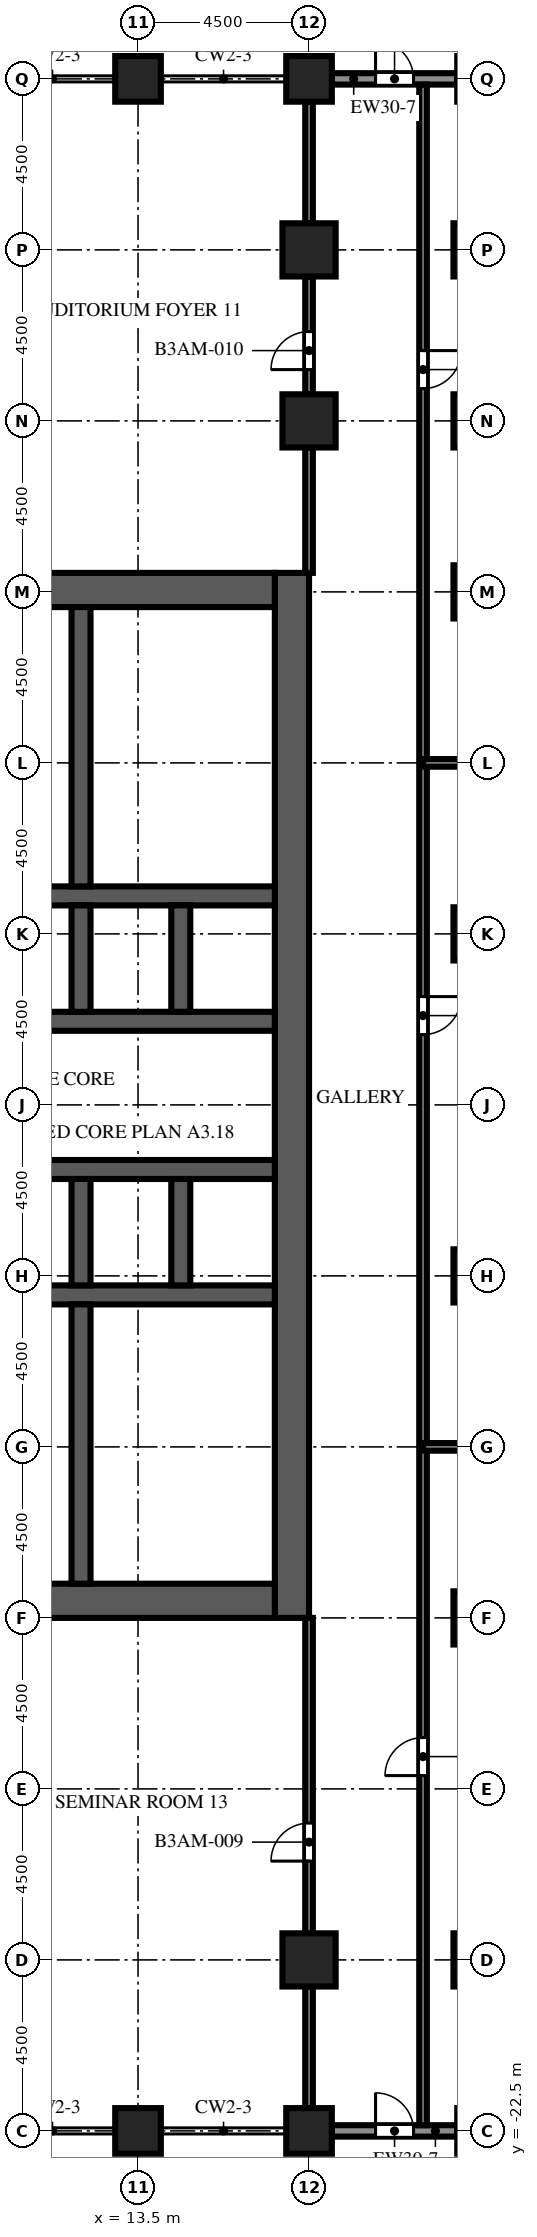
"""IFC4 building model, lengths in metres.
Left out: names, types, materials, properties, quantities, classifications, styles, units other than length and angle.
Written with IfcOpenShell. Run it as: python <this file> out.ifc"""

import sys

from ifc_helpers import new_model, si_unit, direction, frame, frame_2d, origin, origin_2d, place, context, subcontext, project, spatial, rectangle, extrude, element, fill, save


model = new_model("IFC4")
c1 = context("Model", 3, precision=1e-05, world=origin(), true_north=direction((0.0, 1.0)))
c2 = subcontext(c1, "Body", "Model", "MODEL_VIEW")
j1 = project(units=[si_unit("LENGTHUNIT", "METRE"), si_unit("PLANEANGLEUNIT", "RADIAN")], contexts=[c1])
p1 = place(None, origin())
s1 = spatial("IfcSite", under=j1, at=p1, CompositionType="ELEMENT")
p2 = place(p1, origin())
s2 = spatial("IfcBuilding", under=s1, at=p2, CompositionType="ELEMENT")
p3 = place(p2, frame((0.0, 0.0, 110.7)))
s3 = spatial("IfcBuildingStorey", under=s2, at=p3, CompositionType="ELEMENT", Elevation=110.7)
for number, where, z_axis, x_axis in (
    (1, (13.5, -22.5, 0.0), (0.0, 0.0, 1.0), (1.0, 0.0, 0.0)),
    (2, (13.5, 31.5, 0.0), (0.0, 0.0, 1.0), (1.0, 0.0, 0.0)),
    (3, (18.0, -22.5, 0.0), (0.0, 0.0, 1.0), (1.0, 0.0, 0.0)),
    (4, (18.0, 31.5, 0.0), (0.0, 0.0, 1.0), (1.0, 0.0, 0.0)),
):
    element("IfcColumn", number, at=place(p3, frame(where, z_axis=z_axis, x_axis=x_axis)), inside=s3, PredefinedType="COLUMN", context=c2, shape_type="SweptSolid", body=[
        extrude(rectangle(XDim=1.2, YDim=1.2, at=origin_2d()), origin(), (0.0, 0.0, 1.0), 6.0),
    ])
for number, where, z_axis, x_axis in (
    (5, (18.0, -18.0, 0.0), (0.0, 0.0, 1.0), (1.0, 0.0, 0.0)),
    (6, (18.0, 22.5, 0.0), (0.0, 0.0, 1.0), (1.0, 0.0, 0.0)),
    (7, (18.0, 27.0, 0.0), (0.0, 0.0, 1.0), (1.0, 0.0, 0.0)),
    (8, (22.5, -18.0, 0.0), (0.0, 0.0, 1.0), (1.0, 0.0, 0.0)),
    (9, (22.5, -9.0, 0.0), (0.0, 0.0, 1.0), (1.0, 0.0, 0.0)),
    (10, (22.5, 0.0, 0.0), (0.0, 0.0, 1.0), (1.0, 0.0, 0.0)),
    (11, (22.5, 9.0, 0.0), (0.0, 0.0, 1.0), (1.0, 0.0, 0.0)),
    (12, (22.5, 18.0, 0.0), (0.0, 0.0, 1.0), (1.0, 0.0, 0.0)),
    (13, (22.5, 22.5, 0.0), (0.0, 0.0, 1.0), (1.0, 0.0, 0.0)),
    (14, (22.5, 27.0, 0.0), (0.0, 0.0, 1.0), (1.0, 0.0, 0.0)),
):
    element("IfcColumn", number, at=place(p3, frame(where, z_axis=z_axis, x_axis=x_axis)), inside=s3, PredefinedType="COLUMN", context=c2, shape_type="SweptSolid", body=[
        extrude(rectangle(XDim=1.4, YDim=1.4, at=origin_2d()), origin(), (0.0, 0.0, 1.0), 6.0),
    ])
p4 = place(p3, frame((17.55, -9.0, 0.0), z_axis=(0.0, 0.0, 1.0), x_axis=(0.0, 1.0, 0.0)))
e15 = element("IfcWall", 15, at=p4, inside=s3, PredefinedType="SHEAR", context=c2, shape_type="SweptSolid", body=[
    extrude(rectangle(XDim=27.5, YDim=0.9, at=frame_2d((13.75, 0.0))), origin(), (0.0, 0.0, 1.0), 6.0),
])
p5 = place(p4, frame((12.55, 0.0, 0.0)))
e16 = element("IfcOpeningElement", 16, at=p5, cuts=e15, PredefinedType="OPENING", context=c2, shape_type="SweptSolid", body=[
    extrude(rectangle(XDim=2.4, YDim=2.4, at=frame_2d((1.2, 1.2))), frame((0.0, 0.46, 0.0), z_axis=(0.0, -1.0, 0.0), x_axis=(1.0, 0.0, 0.0)), (0.0, 0.0, 1.0), 0.92),
])
p6 = place(p4, frame((6.825, 0.0, 0.0)))
e17 = element("IfcOpeningElement", 17, at=p6, cuts=e15, PredefinedType="OPENING", context=c2, shape_type="SweptSolid", body=[
    extrude(rectangle(XDim=1.2, YDim=2.1, at=frame_2d((0.6, 1.05))), frame((0.0, 0.46, 0.0), z_axis=(0.0, -1.0, 0.0), x_axis=(1.0, 0.0, 0.0)), (0.0, 0.0, 1.0), 0.92),
])
p7 = place(p4, frame((19.475, 0.0, 0.0)))
e18 = element("IfcOpeningElement", 18, at=p7, cuts=e15, PredefinedType="OPENING", context=c2, shape_type="SweptSolid", body=[
    extrude(rectangle(XDim=1.2, YDim=2.1, at=frame_2d((0.6, 1.05))), frame((0.0, 0.46, 0.0), z_axis=(0.0, -1.0, 0.0), x_axis=(1.0, 0.0, 0.0)), (0.0, 0.0, 1.0), 0.92),
])
for number, where, z_axis, x_axis in (
    (19, (6.9, -8.55, 0.0), (0.0, 0.0, 1.0), (1.0, 0.0, 0.0)),
    (20, (6.9, 18.05, 0.0), (0.0, 0.0, 1.0), (1.0, 0.0, 0.0)),
):
    element("IfcWall", number, at=place(p3, frame(where, z_axis=z_axis, x_axis=x_axis)), inside=s3, PredefinedType="SHEAR", context=c2, shape_type="SweptSolid", body=[
        extrude(rectangle(XDim=10.2, YDim=0.9, at=frame_2d((5.1, 0.0))), origin(), (0.0, 0.0, 1.0), 6.0),
    ])
p8 = place(p3, frame((6.9, -0.5, 0.0), z_axis=(0.0, 0.0, 1.0), x_axis=(1.0, 0.0, 0.0)))
e21 = element("IfcWall", 21, at=p8, inside=s3, PredefinedType="SHEAR", context=c2, shape_type="SweptSolid", body=[
    extrude(rectangle(XDim=10.2, YDim=0.5, at=frame_2d((5.1, 0.0))), origin(), (0.0, 0.0, 1.0), 6.0),
])
p9 = place(p3, frame((6.9, 2.8, 0.0), z_axis=(0.0, 0.0, 1.0), x_axis=(1.0, 0.0, 0.0)))
e22 = element("IfcWall", 22, at=p9, inside=s3, PredefinedType="SHEAR", context=c2, shape_type="SweptSolid", body=[
    extrude(rectangle(XDim=10.2, YDim=0.5, at=frame_2d((5.1, 0.0))), origin(), (0.0, 0.0, 1.0), 6.0),
])
p10 = place(p9, frame((0.562, 0.0, 0.0)))
e23 = element("IfcOpeningElement", 23, at=p10, cuts=e22, PredefinedType="OPENING", context=c2, shape_type="SweptSolid", body=[
    extrude(rectangle(XDim=1.1, YDim=2.1, at=frame_2d((0.55, 1.05))), frame((0.0, 0.26, 0.0), z_axis=(0.0, -1.0, 0.0), x_axis=(1.0, 0.0, 0.0)), (0.0, 0.0, 1.0), 0.52),
])
p11 = place(p9, frame((3.238, 0.0, 0.0)))
e24 = element("IfcOpeningElement", 24, at=p11, cuts=e22, PredefinedType="OPENING", context=c2, shape_type="SweptSolid", body=[
    extrude(rectangle(XDim=1.1, YDim=2.1, at=frame_2d((0.55, 1.05))), frame((0.0, 0.26, 0.0), z_axis=(0.0, -1.0, 0.0), x_axis=(1.0, 0.0, 0.0)), (0.0, 0.0, 1.0), 0.52),
])
p12 = place(p9, frame((8.538, 0.0, 0.0)))
e25 = element("IfcOpeningElement", 25, at=p12, cuts=e22, PredefinedType="OPENING", context=c2, shape_type="SweptSolid", body=[
    extrude(rectangle(XDim=1.1, YDim=2.1, at=frame_2d((0.55, 1.05))), frame((0.0, 0.26, 0.0), z_axis=(0.0, -1.0, 0.0), x_axis=(1.0, 0.0, 0.0)), (0.0, 0.0, 1.0), 0.52),
])
p13 = place(p3, frame((6.9, 6.7, 0.0), z_axis=(0.0, 0.0, 1.0), x_axis=(1.0, 0.0, 0.0)))
e26 = element("IfcWall", 26, at=p13, inside=s3, PredefinedType="SHEAR", context=c2, shape_type="SweptSolid", body=[
    extrude(rectangle(XDim=10.2, YDim=0.5, at=frame_2d((5.1, 0.0))), origin(), (0.0, 0.0, 1.0), 6.0),
])
p14 = place(p13, frame((0.562, 0.0, 0.0)))
e27 = element("IfcOpeningElement", 27, at=p14, cuts=e26, PredefinedType="OPENING", context=c2, shape_type="SweptSolid", body=[
    extrude(rectangle(XDim=1.1, YDim=2.1, at=frame_2d((0.55, 1.05))), frame((0.0, 0.26, 0.0), z_axis=(0.0, -1.0, 0.0), x_axis=(1.0, 0.0, 0.0)), (0.0, 0.0, 1.0), 0.52),
])
p15 = place(p13, frame((3.288, 0.0, 0.0)))
e28 = element("IfcOpeningElement", 28, at=p15, cuts=e26, PredefinedType="OPENING", context=c2, shape_type="SweptSolid", body=[
    extrude(rectangle(XDim=1.0, YDim=2.1, at=frame_2d((0.5, 1.05))), frame((0.0, 0.26, 0.0), z_axis=(0.0, -1.0, 0.0), x_axis=(1.0, 0.0, 0.0)), (0.0, 0.0, 1.0), 0.52),
])
p16 = place(p13, frame((5.913, 0.0, 0.0)))
e29 = element("IfcOpeningElement", 29, at=p16, cuts=e26, PredefinedType="OPENING", context=c2, shape_type="SweptSolid", body=[
    extrude(rectangle(XDim=1.0, YDim=2.1, at=frame_2d((0.5, 1.05))), frame((0.0, 0.26, 0.0), z_axis=(0.0, -1.0, 0.0), x_axis=(1.0, 0.0, 0.0)), (0.0, 0.0, 1.0), 0.52),
])
p17 = place(p13, frame((8.587, 0.0, 0.0)))
e30 = element("IfcOpeningElement", 30, at=p17, cuts=e26, PredefinedType="OPENING", context=c2, shape_type="SweptSolid", body=[
    extrude(rectangle(XDim=1.0, YDim=2.1, at=frame_2d((0.5, 1.05))), frame((0.0, 0.26, 0.0), z_axis=(0.0, -1.0, 0.0), x_axis=(1.0, 0.0, 0.0)), (0.0, 0.0, 1.0), 0.52),
])
p18 = place(p3, frame((6.9, 10.0, 0.0), z_axis=(0.0, 0.0, 1.0), x_axis=(1.0, 0.0, 0.0)))
e31 = element("IfcWall", 31, at=p18, inside=s3, PredefinedType="SHEAR", context=c2, shape_type="SweptSolid", body=[
    extrude(rectangle(XDim=10.2, YDim=0.5, at=frame_2d((5.1, 0.0))), origin(), (0.0, 0.0, 1.0), 6.0),
])
for number, where, z_axis, x_axis in (
    (32, (12.0, -0.25, 0.0), (0.0, 0.0, 1.0), (0.0, 1.0, 0.0)),
    (33, (12.0, 6.95, 0.0), (0.0, 0.0, 1.0), (0.0, 1.0, 0.0)),
    (34, (14.625, -0.25, 0.0), (0.0, 0.0, 1.0), (0.0, 1.0, 0.0)),
    (35, (14.625, 6.95, 0.0), (0.0, 0.0, 1.0), (0.0, 1.0, 0.0)),
):
    element("IfcWall", number, at=place(p3, frame(where, z_axis=z_axis, x_axis=x_axis)), inside=s3, PredefinedType="SHEAR", context=c2, shape_type="SweptSolid", body=[
        extrude(rectangle(XDim=2.8, YDim=0.5, at=frame_2d((1.4, 0.0))), origin(), (0.0, 0.0, 1.0), 6.0),
    ])
for number, where, z_axis, x_axis in (
    (36, (12.0, -8.1, 0.0), (0.0, 0.0, 1.0), (0.0, 1.0, 0.0)),
    (37, (12.0, 10.25, 0.0), (0.0, 0.0, 1.0), (0.0, 1.0, 0.0)),
):
    element("IfcWall", number, at=place(p3, frame(where, z_axis=z_axis, x_axis=x_axis)), inside=s3, PredefinedType="SHEAR", context=c2, shape_type="SweptSolid", body=[
        extrude(rectangle(XDim=7.35, YDim=0.5, at=frame_2d((3.675, 0.0))), origin(), (0.0, 0.0, 1.0), 6.0),
    ])
p19 = place(p3, frame((21.9, -22.5, 0.0), z_axis=(0.0, 0.0, 1.0), x_axis=(-1.0, 0.0, 0.0)))
e38 = element("IfcWall", 38, at=p19, inside=s3, PredefinedType="SOLIDWALL", context=c2, shape_type="SweptSolid", body=[
    extrude(rectangle(XDim=3.3, YDim=0.3, at=frame_2d((1.65, 0.0))), origin(), (0.0, 0.0, 1.0), 4.65),
])
p20 = place(p19, frame((1.15, 0.0, 0.0)))
e39 = element("IfcOpeningElement", 39, at=p20, cuts=e38, PredefinedType="OPENING", context=c2, shape_type="SweptSolid", body=[
    extrude(rectangle(XDim=1.0, YDim=2.2, at=frame_2d((0.5, 1.1))), frame((0.0, 0.16, 0.0), z_axis=(0.0, -1.0, 0.0), x_axis=(1.0, 0.0, 0.0)), (0.0, 0.0, 1.0), 0.32),
])
p21 = place(p3, frame((18.6, 31.5, 0.0), z_axis=(0.0, 0.0, 1.0), x_axis=(1.0, 0.0, 0.0)))
e40 = element("IfcWall", 40, at=p21, inside=s3, PredefinedType="SOLIDWALL", context=c2, shape_type="SweptSolid", body=[
    extrude(rectangle(XDim=3.3, YDim=0.3, at=frame_2d((1.65, 0.0))), origin(), (0.0, 0.0, 1.0), 4.65),
])
p22 = place(p21, frame((1.15, 0.0, 0.0)))
e41 = element("IfcOpeningElement", 41, at=p22, cuts=e40, PredefinedType="OPENING", context=c2, shape_type="SweptSolid", body=[
    extrude(rectangle(XDim=1.0, YDim=2.2, at=frame_2d((0.5, 1.1))), frame((0.0, 0.16, 0.0), z_axis=(0.0, -1.0, 0.0), x_axis=(1.0, 0.0, 0.0)), (0.0, 0.0, 1.0), 0.32),
])
for number, where, z_axis, x_axis in (
    (42, (8.5, -5.895, 0.0), (0.0, 0.0, 1.0), (1.0, 0.0, 0.0)),
    (43, (8.5, -2.955, 0.0), (0.0, 0.0, 1.0), (1.0, 0.0, 0.0)),
):
    element("IfcWall", number, at=place(p3, frame(where, z_axis=z_axis, x_axis=x_axis)), inside=s3, PredefinedType="PARTITIONING", context=c2, shape_type="SweptSolid", body=[
        extrude(rectangle(XDim=3.25, YDim=0.1, at=frame_2d((1.625, 0.0))), origin(), (0.0, 0.0, 1.0), 5.55),
    ])
for number, where, z_axis, x_axis in (
    (44, (6.9, 11.72, 0.0), (0.0, 0.0, 1.0), (1.0, 0.0, 0.0)),
    (45, (6.9, 13.558, 0.0), (0.0, 0.0, 1.0), (1.0, 0.0, 0.0)),
    (46, (6.9, 15.762, 0.0), (0.0, 0.0, 1.0), (1.0, 0.0, 0.0)),
):
    element("IfcWall", number, at=place(p3, frame(where, z_axis=z_axis, x_axis=x_axis)), inside=s3, PredefinedType="PARTITIONING", context=c2, shape_type="SweptSolid", body=[
        extrude(rectangle(XDim=4.85, YDim=0.1, at=frame_2d((2.425, 0.0))), origin(), (0.0, 0.0, 1.0), 5.55),
    ])
p23 = place(p3, frame((18.0, -21.9, 0.0), z_axis=(0.0, 0.0, 1.0), x_axis=(0.0, 1.0, 0.0)))
e47 = element("IfcWall", 47, at=p23, inside=s3, PredefinedType="PARTITIONING", context=c2, shape_type="SweptSolid", body=[
    extrude(rectangle(XDim=3.2, YDim=0.2, at=frame_2d((1.6, 0.0))), origin(), (0.0, 0.0, 1.0), 5.55),
])
p24 = place(p3, frame((18.0, -17.3, 0.0), z_axis=(0.0, 0.0, 1.0), x_axis=(0.0, 1.0, 0.0)))
e48 = element("IfcWall", 48, at=p24, inside=s3, PredefinedType="PARTITIONING", context=c2, shape_type="SweptSolid", body=[
    extrude(rectangle(XDim=8.3, YDim=0.2, at=frame_2d((4.15, 0.0))), origin(), (0.0, 0.0, 1.0), 5.55),
])
p25 = place(p24, frame((1.9, 0.0, 0.0)))
e49 = element("IfcOpeningElement", 49, at=p25, cuts=e48, PredefinedType="OPENING", context=c2, shape_type="SweptSolid", body=[
    extrude(rectangle(XDim=1.0, YDim=2.1, at=frame_2d((0.5, 1.05))), frame((0.0, 0.11, 0.0), z_axis=(0.0, -1.0, 0.0), x_axis=(1.0, 0.0, 0.0)), (0.0, 0.0, 1.0), 0.22),
])
p26 = place(p3, frame((18.0, 18.5, 0.0), z_axis=(0.0, 0.0, 1.0), x_axis=(0.0, 1.0, 0.0)))
e50 = element("IfcWall", 50, at=p26, inside=s3, PredefinedType="PARTITIONING", context=c2, shape_type="SweptSolid", body=[
    extrude(rectangle(XDim=3.3, YDim=0.2, at=frame_2d((1.65, 0.0))), origin(), (0.0, 0.0, 1.0), 5.55),
])
p27 = place(p3, frame((18.0, 23.2, 0.0), z_axis=(0.0, 0.0, 1.0), x_axis=(0.0, 1.0, 0.0)))
e51 = element("IfcWall", 51, at=p27, inside=s3, PredefinedType="PARTITIONING", context=c2, shape_type="SweptSolid", body=[
    extrude(rectangle(XDim=3.1, YDim=0.2, at=frame_2d((1.55, 0.0))), origin(), (0.0, 0.0, 1.0), 5.55),
])
p28 = place(p27, frame((0.65, 0.0, 0.0)))
e52 = element("IfcOpeningElement", 52, at=p28, cuts=e51, PredefinedType="OPENING", context=c2, shape_type="SweptSolid", body=[
    extrude(rectangle(XDim=1.0, YDim=2.1, at=frame_2d((0.5, 1.05))), frame((0.0, 0.11, 0.0), z_axis=(0.0, -1.0, 0.0), x_axis=(1.0, 0.0, 0.0)), (0.0, 0.0, 1.0), 0.22),
])
p29 = place(p3, frame((18.0, 27.7, 0.0), z_axis=(0.0, 0.0, 1.0), x_axis=(0.0, 1.0, 0.0)))
e53 = element("IfcWall", 53, at=p29, inside=s3, PredefinedType="PARTITIONING", context=c2, shape_type="SweptSolid", body=[
    extrude(rectangle(XDim=3.2, YDim=0.2, at=frame_2d((1.6, 0.0))), origin(), (0.0, 0.0, 1.0), 5.55),
])
p30 = place(p3, frame((21.0, 31.35, 0.0), z_axis=(0.0, 0.0, 1.0), x_axis=(0.0, -1.0, 0.0)))
e54 = element("IfcWall", 54, at=p30, inside=s3, PredefinedType="PARTITIONING", context=c2, shape_type="SweptSolid", body=[
    extrude(rectangle(XDim=53.7, YDim=0.2, at=frame_2d((26.85, 0.0))), origin(), (0.0, 0.0, 1.0), 5.55),
])
p31 = place(p30, frame((43.5, 0.0, 0.0)))
e55 = element("IfcOpeningElement", 55, at=p31, cuts=e54, PredefinedType="OPENING", context=c2, shape_type="SweptSolid", body=[
    extrude(rectangle(XDim=1.0, YDim=2.1, at=frame_2d((0.5, 1.05))), frame((0.0, 0.11, 0.0), z_axis=(0.0, -1.0, 0.0), x_axis=(1.0, 0.0, 0.0)), (0.0, 0.0, 1.0), 0.22),
])
p32 = place(p30, frame((24.0, 0.0, 0.0)))
e56 = element("IfcOpeningElement", 56, at=p32, cuts=e54, PredefinedType="OPENING", context=c2, shape_type="SweptSolid", body=[
    extrude(rectangle(XDim=1.0, YDim=2.1, at=frame_2d((0.5, 1.05))), frame((0.0, 0.11, 0.0), z_axis=(0.0, -1.0, 0.0), x_axis=(1.0, 0.0, 0.0)), (0.0, 0.0, 1.0), 0.22),
])
p33 = place(p30, frame((7.0, 0.0, 0.0)))
e57 = element("IfcOpeningElement", 57, at=p33, cuts=e54, PredefinedType="OPENING", context=c2, shape_type="SweptSolid", body=[
    extrude(rectangle(XDim=1.0, YDim=2.1, at=frame_2d((0.5, 1.05))), frame((0.0, 0.11, 0.0), z_axis=(0.0, -1.0, 0.0), x_axis=(1.0, 0.0, 0.0)), (0.0, 0.0, 1.0), 0.22),
])
for number, where, z_axis, x_axis in (
    (58, (21.0, -4.5, 0.0), (0.0, 0.0, 1.0), (1.0, 0.0, 0.0)),
    (59, (21.0, 13.5, 0.0), (0.0, 0.0, 1.0), (1.0, 0.0, 0.0)),
):
    element("IfcWall", number, at=place(p3, frame(where, z_axis=z_axis, x_axis=x_axis)), inside=s3, PredefinedType="PARTITIONING", context=c2, shape_type="SweptSolid", body=[
        extrude(rectangle(XDim=5.55, YDim=0.2, at=frame_2d((2.775, 0.0))), origin(), (0.0, 0.0, 1.0), 5.55),
    ])
p34 = place(p20, origin())
e60 = element("IfcDoor", 60, at=p34, inside=s3, OperationType="SINGLE_SWING_RIGHT", PredefinedType="DOOR", context=c2, shape_type="SweptSolid", body=[
    extrude(rectangle(XDim=1.0, YDim=2.2, at=frame_2d((0.5, 1.1))), frame((0.0, 0.025, 0.0), z_axis=(0.0, -1.0, 0.0), x_axis=(1.0, 0.0, 0.0)), (0.0, 0.0, 1.0), 0.05),
])
fill(e39, e60)
p35 = place(p22, origin())
e61 = element("IfcDoor", 61, at=p35, inside=s3, OperationType="SINGLE_SWING_LEFT", PredefinedType="DOOR", context=c2, shape_type="SweptSolid", body=[
    extrude(rectangle(XDim=1.0, YDim=2.2, at=frame_2d((0.5, 1.1))), frame((0.0, 0.025, 0.0), z_axis=(0.0, -1.0, 0.0), x_axis=(1.0, 0.0, 0.0)), (0.0, 0.0, 1.0), 0.05),
])
fill(e41, e61)
p36 = place(p12, origin())
e62 = element("IfcDoor", 62, at=p36, inside=s3, OperationType="DOUBLE_DOOR_SLIDING", PredefinedType="DOOR", context=c2, shape_type="SweptSolid", body=[
    extrude(rectangle(XDim=1.1, YDim=2.1, at=frame_2d((0.55, 1.05))), frame((0.0, 0.025, 0.0), z_axis=(0.0, -1.0, 0.0), x_axis=(1.0, 0.0, 0.0)), (0.0, 0.0, 1.0), 0.05),
])
fill(e25, e62)
p37 = place(p5, origin())
e63 = element("IfcDoor", 63, at=p37, inside=s3, OperationType="DOUBLE_DOOR_DOUBLE_SWING", PredefinedType="DOOR", context=c2, shape_type="SweptSolid", body=[
    extrude(rectangle(XDim=2.4, YDim=2.4, at=frame_2d((1.2, 1.2))), frame((0.0, 0.025, 0.0), z_axis=(0.0, -1.0, 0.0), x_axis=(1.0, 0.0, 0.0)), (0.0, 0.0, 1.0), 0.05),
])
fill(e16, e63)
p38 = place(p6, frame((1.2, 0.0, 0.0), z_axis=(0.0, 0.0, 1.0), x_axis=(-1.0, 0.0, 0.0)))
e64 = element("IfcDoor", 64, at=p38, inside=s3, OperationType="SINGLE_SWING_LEFT", PredefinedType="DOOR", context=c2, shape_type="SweptSolid", body=[
    extrude(rectangle(XDim=1.2, YDim=2.1, at=frame_2d((0.6, 1.05))), frame((0.0, 0.025, 0.0), z_axis=(0.0, -1.0, 0.0), x_axis=(1.0, 0.0, 0.0)), (0.0, 0.0, 1.0), 0.05),
])
fill(e17, e64)
p39 = place(p7, frame((1.2, 0.0, 0.0), z_axis=(0.0, 0.0, 1.0), x_axis=(-1.0, 0.0, 0.0)))
e65 = element("IfcDoor", 65, at=p39, inside=s3, OperationType="SINGLE_SWING_LEFT", PredefinedType="DOOR", context=c2, shape_type="SweptSolid", body=[
    extrude(rectangle(XDim=1.2, YDim=2.1, at=frame_2d((0.6, 1.05))), frame((0.0, 0.025, 0.0), z_axis=(0.0, -1.0, 0.0), x_axis=(1.0, 0.0, 0.0)), (0.0, 0.0, 1.0), 0.05),
])
fill(e18, e65)
p40 = place(p16, origin())
e66 = element("IfcDoor", 66, at=p40, inside=s3, OperationType="SINGLE_SWING_LEFT", PredefinedType="DOOR", context=c2, shape_type="SweptSolid", body=[
    extrude(rectangle(XDim=1.0, YDim=2.1, at=frame_2d((0.5, 1.05))), frame((0.0, 0.025, 0.0), z_axis=(0.0, -1.0, 0.0), x_axis=(1.0, 0.0, 0.0)), (0.0, 0.0, 1.0), 0.05),
])
fill(e29, e66)
p41 = place(p17, origin())
e67 = element("IfcDoor", 67, at=p41, inside=s3, OperationType="SINGLE_SWING_RIGHT", PredefinedType="DOOR", context=c2, shape_type="SweptSolid", body=[
    extrude(rectangle(XDim=1.0, YDim=2.1, at=frame_2d((0.5, 1.05))), frame((0.0, 0.025, 0.0), z_axis=(0.0, -1.0, 0.0), x_axis=(1.0, 0.0, 0.0)), (0.0, 0.0, 1.0), 0.05),
])
fill(e30, e67)
p42 = place(p25, origin())
e68 = element("IfcDoor", 68, at=p42, inside=s3, OperationType="SINGLE_SWING_LEFT", PredefinedType="DOOR", context=c2, shape_type="SweptSolid", body=[
    extrude(rectangle(XDim=1.0, YDim=2.1, at=frame_2d((0.5, 1.05))), frame((0.0, 0.025, 0.0), z_axis=(0.0, -1.0, 0.0), x_axis=(1.0, 0.0, 0.0)), (0.0, 0.0, 1.0), 0.05),
])
fill(e49, e68)
p43 = place(p28, origin())
e69 = element("IfcDoor", 69, at=p43, inside=s3, OperationType="SINGLE_SWING_LEFT", PredefinedType="DOOR", context=c2, shape_type="SweptSolid", body=[
    extrude(rectangle(XDim=1.0, YDim=2.1, at=frame_2d((0.5, 1.05))), frame((0.0, 0.025, 0.0), z_axis=(0.0, -1.0, 0.0), x_axis=(1.0, 0.0, 0.0)), (0.0, 0.0, 1.0), 0.05),
])
fill(e52, e69)
p44 = place(p31, origin())
e70 = element("IfcDoor", 70, at=p44, inside=s3, OperationType="SINGLE_SWING_RIGHT", PredefinedType="DOOR", context=c2, shape_type="SweptSolid", body=[
    extrude(rectangle(XDim=1.0, YDim=2.1, at=frame_2d((0.5, 1.05))), frame((0.0, 0.025, 0.0), z_axis=(0.0, -1.0, 0.0), x_axis=(1.0, 0.0, 0.0)), (0.0, 0.0, 1.0), 0.05),
])
fill(e55, e70)
p45 = place(p32, origin())
e71 = element("IfcDoor", 71, at=p45, inside=s3, OperationType="SINGLE_SWING_LEFT", PredefinedType="DOOR", context=c2, shape_type="SweptSolid", body=[
    extrude(rectangle(XDim=1.0, YDim=2.1, at=frame_2d((0.5, 1.05))), frame((0.0, 0.025, 0.0), z_axis=(0.0, -1.0, 0.0), x_axis=(1.0, 0.0, 0.0)), (0.0, 0.0, 1.0), 0.05),
])
fill(e56, e71)
p46 = place(p33, origin())
e72 = element("IfcDoor", 72, at=p46, inside=s3, OperationType="SINGLE_SWING_LEFT", PredefinedType="DOOR", context=c2, shape_type="SweptSolid", body=[
    extrude(rectangle(XDim=1.0, YDim=2.1, at=frame_2d((0.5, 1.05))), frame((0.0, 0.025, 0.0), z_axis=(0.0, -1.0, 0.0), x_axis=(1.0, 0.0, 0.0)), (0.0, 0.0, 1.0), 0.05),
])
fill(e57, e72)
save(model, sys.argv[1])
